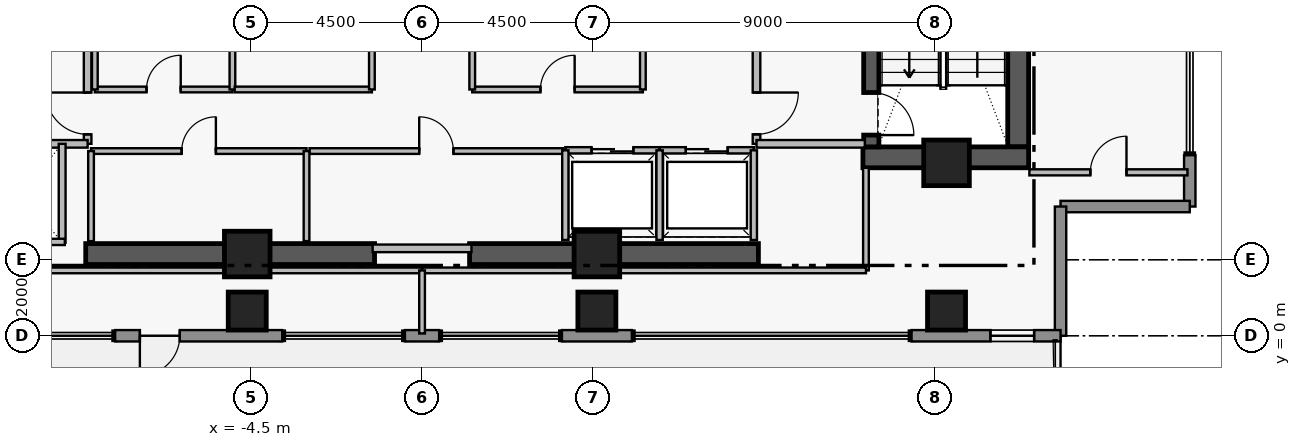
"""IFC4 building model, lengths in metres.
Left out: names, types, materials, properties, quantities, classifications, styles, units other than length and angle.
Written with IfcOpenShell. Run it as: python <this file> out.ifc"""

import sys

from ifc_helpers import new_model, si_unit, direction, frame, frame_2d, origin, origin_2d, place, context, subcontext, project, spatial, rectangle, extrude, element, fill, save


model = new_model("IFC4")
c1 = context("Model", 3, precision=1e-05, world=origin(), true_north=direction((0.0, 1.0)))
c2 = subcontext(c1, "Body", "Model", "MODEL_VIEW")
j1 = project(units=[si_unit("LENGTHUNIT", "METRE"), si_unit("PLANEANGLEUNIT", "RADIAN")], contexts=[c1])
p1 = place(None, origin())
s1 = spatial("IfcSite", under=j1, at=p1, CompositionType="ELEMENT")
p2 = place(p1, origin())
s2 = spatial("IfcBuilding", under=s1, at=p2, CompositionType="ELEMENT")
p3 = place(p2, frame((0.0, 0.0, 265.55)))
s3 = spatial("IfcBuildingStorey", under=s2, at=p3, CompositionType="ELEMENT", Elevation=265.55)
p4 = place(p3, frame((15.685, 4.97, 0.0), z_axis=(0.0, 0.0, 1.0), x_axis=(0.0, 1.0, 0.0)))
e1 = element("IfcWall", 1, at=p4, inside=s3, PredefinedType="SHEAR", context=c2, shape_type="SweptSolid", body=[
    extrude(rectangle(XDim=8.96, YDim=0.55, at=frame_2d((4.48, 0.0))), origin(), (0.0, 0.0, 1.0), 3.51),
])
p5 = place(p3, frame((11.6, 4.695, 0.0), z_axis=(0.0, 0.0, 1.0), x_axis=(1.0, 0.0, 0.0)))
e2 = element("IfcWall", 2, at=p5, inside=s3, PredefinedType="SHEAR", context=c2, shape_type="SweptSolid", body=[
    extrude(rectangle(XDim=4.36, YDim=0.55, at=frame_2d((2.18, 0.0))), origin(), (0.0, 0.0, 1.0), 3.51),
])
for number, where, z_axis, x_axis in (
    (3, (-8.85, 2.15, 0.0), (0.0, 0.0, 1.0), (1.0, 0.0, 0.0)),
    (4, (1.25, 2.15, 0.0), (0.0, 0.0, 1.0), (1.0, 0.0, 0.0)),
):
    element("IfcWall", number, at=place(p3, frame(where, z_axis=z_axis, x_axis=x_axis)), inside=s3, PredefinedType="SHEAR", context=c2, shape_type="SweptSolid", body=[
        extrude(rectangle(XDim=7.6, YDim=0.55, at=frame_2d((3.8, 0.0))), origin(), (0.0, 0.0, 1.0), 3.48),
    ])
p6 = place(p3, frame((11.82, 13.93, 0.0), z_axis=(0.0, 0.0, 1.0), x_axis=(0.0, -1.0, 0.0)))
e5 = element("IfcWall", 5, at=p6, inside=s3, PredefinedType="SHEAR", context=c2, shape_type="SweptSolid", body=[
    extrude(rectangle(XDim=8.96, YDim=0.4, at=frame_2d((4.48, 0.0))), origin(), (0.0, 0.0, 1.0), 3.51),
])
p7 = place(p6, frame((7.53, 0.0, 0.0)))
e6 = element("IfcOpeningElement", 6, at=p7, cuts=e5, PredefinedType="OPENING", context=c2, shape_type="SweptSolid", body=[
    extrude(rectangle(XDim=1.12, YDim=2.22, at=frame_2d((0.56, 1.11))), frame((0.0, 0.21, 0.0), z_axis=(0.0, -1.0, 0.0), x_axis=(1.0, 0.0, 0.0)), (0.0, 0.0, 1.0), 0.42),
])
for number, where, z_axis, x_axis in (
    (7, (-4.6, 2.15, 0.0), (0.0, 0.0, 1.0), (1.0, 0.0, 0.0)),
    (8, (4.6, 2.15, 0.0), (0.0, 0.0, 1.0), (1.0, 0.0, 0.0)),
    (9, (13.8, 4.55, 0.0), (0.0, 0.0, 1.0), (1.0, 0.0, 0.0)),
):
    element("IfcColumn", number, at=place(p3, frame(where, z_axis=z_axis, x_axis=x_axis)), inside=s3, PredefinedType="COLUMN", context=c2, shape_type="SweptSolid", body=[
        extrude(rectangle(XDim=1.2, YDim=1.2, at=origin_2d()), origin(), (0.0, 0.0, 1.0), 3.7),
    ])
for number, where, z_axis, x_axis in (
    (10, (-4.6, 0.65, 0.0), (0.0, 0.0, 1.0), (1.0, 0.0, 0.0)),
    (11, (4.6, 0.65, 0.0), (0.0, 0.0, 1.0), (1.0, 0.0, 0.0)),
    (12, (13.8, 0.65, 0.0), (0.0, 0.0, 1.0), (1.0, 0.0, 0.0)),
):
    element("IfcColumn", number, at=place(p3, frame(where, z_axis=z_axis, x_axis=x_axis)), inside=s3, PredefinedType="COLUMN", context=c2, shape_type="SweptSolid", body=[
        extrude(rectangle(XDim=1.0, YDim=1.0, at=origin_2d()), origin(), (0.0, 0.0, 1.0), 3.7),
    ])
p8 = place(p3, frame((20.2, 4.75, 0.0), z_axis=(0.0, 0.0, 1.0), x_axis=(0.0, -1.0, 0.0)))
e13 = element("IfcWall", 13, at=p8, inside=s3, PredefinedType="STANDARD", context=c2, shape_type="SweptSolid", body=[
    extrude(rectangle(XDim=1.35, YDim=0.3, at=frame_2d((0.675, 0.0))), origin(), (0.0, 0.0, 1.0), 3.48),
])
for number, where, z_axis, x_axis in (
    (14, (20.2, 3.4, 0.0), (0.0, 0.0, 1.0), (-1.0, 0.0, 0.0)),
    (15, (16.8, 3.4, 0.0), (0.0, 0.0, 1.0), (0.0, -1.0, 0.0)),
):
    element("IfcWall", number, at=place(p3, frame(where, z_axis=z_axis, x_axis=x_axis)), inside=s3, PredefinedType="STANDARD", context=c2, shape_type="SweptSolid", body=[
        extrude(rectangle(XDim=3.4, YDim=0.3, at=frame_2d((1.7, 0.0))), origin(), (0.0, 0.0, 1.0), 3.48),
    ])
p9 = place(p3, frame((16.8, 0.0, 0.0), z_axis=(0.0, 0.0, 1.0), x_axis=(-1.0, 0.0, 0.0)))
e16 = element("IfcWall", 16, at=p9, inside=s3, PredefinedType="STANDARD", context=c2, shape_type="SweptSolid", body=[
    extrude(rectangle(XDim=3.92, YDim=0.3, at=frame_2d((1.96, 0.0))), origin(), (0.0, 0.0, 1.0), 3.48),
])
p10 = place(p9, frame((0.695, 0.0, 0.95)))
e17 = element("IfcOpeningElement", 17, at=p10, cuts=e16, PredefinedType="OPENING", context=c2, shape_type="SweptSolid", body=[
    extrude(rectangle(XDim=1.15, YDim=1.55, at=frame_2d((0.575, 0.775))), frame((0.0, 0.16, 0.0), z_axis=(0.0, -1.0, 0.0), x_axis=(1.0, 0.0, 0.0)), (0.0, 0.0, 1.0), 0.32),
])
p11 = place(p3, frame((5.52, 0.0, 0.0), z_axis=(0.0, 0.0, 1.0), x_axis=(-1.0, 0.0, 0.0)))
e18 = element("IfcWall", 18, at=p11, inside=s3, PredefinedType="STANDARD", context=c2, shape_type="SweptSolid", body=[
    extrude(rectangle(XDim=1.84, YDim=0.3, at=frame_2d((0.92, 0.0))), origin(), (0.0, 0.0, 1.0), 3.48),
])
p12 = place(p3, frame((0.45, 0.0, 0.0), z_axis=(0.0, 0.0, 1.0), x_axis=(-1.0, 0.0, 0.0)))
e19 = element("IfcWall", 19, at=p12, inside=s3, PredefinedType="STANDARD", context=c2, shape_type="SweptSolid", body=[
    extrude(rectangle(XDim=0.9, YDim=0.3, at=frame_2d((0.45, 0.0))), origin(), (0.0, 0.0, 1.0), 3.48),
])
p13 = place(p3, frame((-3.68, 0.0, 0.0), z_axis=(0.0, 0.0, 1.0), x_axis=(-1.0, 0.0, 0.0)))
e20 = element("IfcWall", 20, at=p13, inside=s3, PredefinedType="STANDARD", context=c2, shape_type="SweptSolid", body=[
    extrude(rectangle(XDim=4.395, YDim=0.3, at=frame_2d((2.198, 0.0))), origin(), (0.0, 0.0, 1.0), 3.48),
])
p14 = place(p13, frame((2.695, 0.0, 0.0)))
e21 = element("IfcOpeningElement", 21, at=p14, cuts=e20, PredefinedType="OPENING", context=c2, shape_type="SweptSolid", body=[
    extrude(rectangle(XDim=1.05, YDim=2.2, at=frame_2d((0.525, 1.1))), frame((0.0, 0.16, 0.0), z_axis=(0.0, -1.0, 0.0), x_axis=(1.0, 0.0, 0.0)), (0.0, 0.0, 1.0), 0.32),
])
p15 = place(p3, frame((-8.8, 5.05, 0.0), z_axis=(0.0, 0.0, 1.0), x_axis=(0.0, 1.0, 0.0)))
e22 = element("IfcWall", 22, at=p15, inside=s3, PredefinedType="PARTITIONING", context=c2, shape_type="SweptSolid", body=[
    extrude(rectangle(XDim=6.1, YDim=0.2, at=frame_2d((3.05, 0.0))), origin(), (0.0, 0.0, 1.0), 3.48),
])
p16 = place(p15, frame((0.25, 0.0, 0.0)))
e23 = element("IfcOpeningElement", 23, at=p16, cuts=e22, PredefinedType="OPENING", context=c2, shape_type="SweptSolid", body=[
    extrude(rectangle(XDim=1.1, YDim=2.2, at=frame_2d((0.55, 1.1))), frame((0.0, 0.11, 0.0), z_axis=(0.0, -1.0, 0.0), x_axis=(1.0, 0.0, 0.0)), (0.0, 0.0, 1.0), 0.22),
])
p17 = place(p15, frame((3.85, 0.0, 0.0)))
e24 = element("IfcOpeningElement", 24, at=p17, cuts=e22, PredefinedType="OPENING", context=c2, shape_type="SweptSolid", body=[
    extrude(rectangle(XDim=1.1, YDim=2.2, at=frame_2d((0.55, 1.1))), frame((0.0, 0.11, 0.0), z_axis=(0.0, -1.0, 0.0), x_axis=(1.0, 0.0, 0.0)), (0.0, 0.0, 1.0), 0.22),
])
p18 = place(p3, frame((8.8, 11.15, 0.0), z_axis=(0.0, 0.0, 1.0), x_axis=(0.0, -1.0, 0.0)))
e25 = element("IfcWall", 25, at=p18, inside=s3, PredefinedType="PARTITIONING", context=c2, shape_type="SweptSolid", body=[
    extrude(rectangle(XDim=6.1, YDim=0.2, at=frame_2d((3.05, 0.0))), origin(), (0.0, 0.0, 1.0), 3.48),
])
p19 = place(p18, frame((1.15, 0.0, 0.0)))
e26 = element("IfcOpeningElement", 26, at=p19, cuts=e25, PredefinedType="OPENING", context=c2, shape_type="SweptSolid", body=[
    extrude(rectangle(XDim=1.1, YDim=2.2, at=frame_2d((0.55, 1.1))), frame((0.0, 0.11, 0.0), z_axis=(0.0, -1.0, 0.0), x_axis=(1.0, 0.0, 0.0)), (0.0, 0.0, 1.0), 0.22),
])
p20 = place(p18, frame((4.75, 0.0, 0.0)))
e27 = element("IfcOpeningElement", 27, at=p20, cuts=e25, PredefinedType="OPENING", context=c2, shape_type="SweptSolid", body=[
    extrude(rectangle(XDim=1.1, YDim=2.2, at=frame_2d((0.55, 1.1))), frame((0.0, 0.11, 0.0), z_axis=(0.0, -1.0, 0.0), x_axis=(1.0, 0.0, 0.0)), (0.0, 0.0, 1.0), 0.22),
])
p21 = place(p3, frame((3.77, 4.88, 0.0), z_axis=(0.0, 0.0, 1.0), x_axis=(1.0, 0.0, 0.0)))
e28 = element("IfcWall", 28, at=p21, inside=s3, PredefinedType="PARTITIONING", context=c2, shape_type="SweptSolid", body=[
    extrude(rectangle(XDim=2.48, YDim=0.165, at=frame_2d((1.24, 0.0))), origin(), (0.0, 0.0, 1.0), 3.48),
])
p22 = place(p21, frame((0.69, 0.0, 0.0)))
e29 = element("IfcOpeningElement", 29, at=p22, cuts=e28, PredefinedType="OPENING", context=c2, shape_type="SweptSolid", body=[
    extrude(rectangle(XDim=1.1, YDim=2.25, at=frame_2d((0.55, 1.125))), frame((0.0, 0.093, 0.0), z_axis=(0.0, -1.0, 0.0), x_axis=(1.0, 0.0, 0.0)), (0.0, 0.0, 1.0), 0.185),
])
p23 = place(p3, frame((6.25, 4.88, 0.0), z_axis=(0.0, 0.0, 1.0), x_axis=(1.0, 0.0, 0.0)))
e30 = element("IfcWall", 30, at=p23, inside=s3, PredefinedType="PARTITIONING", context=c2, shape_type="SweptSolid", body=[
    extrude(rectangle(XDim=2.48, YDim=0.165, at=frame_2d((1.24, 0.0))), origin(), (0.0, 0.0, 1.0), 3.48),
])
p24 = place(p23, frame((0.69, 0.0, 0.0)))
e31 = element("IfcOpeningElement", 31, at=p24, cuts=e30, PredefinedType="OPENING", context=c2, shape_type="SweptSolid", body=[
    extrude(rectangle(XDim=1.1, YDim=2.25, at=frame_2d((0.55, 1.125))), frame((0.0, 0.093, 0.0), z_axis=(0.0, -1.0, 0.0), x_axis=(1.0, 0.0, 0.0)), (0.0, 0.0, 1.0), 0.185),
])
p25 = place(p3, frame((-8.71, 4.86, 0.0), z_axis=(0.0, 0.0, 1.0), x_axis=(1.0, 0.0, 0.0)))
e32 = element("IfcWall", 32, at=p25, inside=s3, PredefinedType="PARTITIONING", context=c2, shape_type="SweptSolid", body=[
    extrude(rectangle(XDim=5.67, YDim=0.15, at=frame_2d((2.835, 0.0))), origin(), (0.0, 0.0, 1.0), 3.48),
])
p26 = place(p25, frame((2.385, 0.0, 0.0)))
e33 = element("IfcOpeningElement", 33, at=p26, cuts=e32, PredefinedType="OPENING", context=c2, shape_type="SweptSolid", body=[
    extrude(rectangle(XDim=0.9, YDim=2.15, at=frame_2d((0.45, 1.075))), frame((0.0, 0.085, 0.0), z_axis=(0.0, -1.0, 0.0), x_axis=(1.0, 0.0, 0.0)), (0.0, 0.0, 1.0), 0.17),
])
p27 = place(p3, frame((-2.96, 4.86, 0.0), z_axis=(0.0, 0.0, 1.0), x_axis=(1.0, 0.0, 0.0)))
e34 = element("IfcWall", 34, at=p27, inside=s3, PredefinedType="PARTITIONING", context=c2, shape_type="SweptSolid", body=[
    extrude(rectangle(XDim=6.67, YDim=0.15, at=frame_2d((3.335, 0.0))), origin(), (0.0, 0.0, 1.0), 3.48),
])
p28 = place(p27, frame((2.885, 0.0, 0.0)))
e35 = element("IfcOpeningElement", 35, at=p28, cuts=e34, PredefinedType="OPENING", context=c2, shape_type="SweptSolid", body=[
    extrude(rectangle(XDim=0.9, YDim=2.15, at=frame_2d((0.45, 1.075))), frame((0.0, 0.085, 0.0), z_axis=(0.0, -1.0, 0.0), x_axis=(1.0, 0.0, 0.0)), (0.0, 0.0, 1.0), 0.17),
])
p29 = place(p3, frame((-8.61, 6.48, 0.0), z_axis=(0.0, 0.0, 1.0), x_axis=(1.0, 0.0, 0.0)))
e36 = element("IfcWall", 36, at=p29, inside=s3, PredefinedType="PARTITIONING", context=c2, shape_type="SweptSolid", body=[
    extrude(rectangle(XDim=3.62, YDim=0.15, at=frame_2d((1.81, 0.0))), origin(), (0.0, 0.0, 1.0), 3.48),
])
p30 = place(p29, frame((1.36, 0.0, 0.0)))
e37 = element("IfcOpeningElement", 37, at=p30, cuts=e36, PredefinedType="OPENING", context=c2, shape_type="SweptSolid", body=[
    extrude(rectangle(XDim=0.9, YDim=2.15, at=frame_2d((0.45, 1.075))), frame((0.0, 0.085, 0.0), z_axis=(0.0, -1.0, 0.0), x_axis=(1.0, 0.0, 0.0)), (0.0, 0.0, 1.0), 0.17),
])
p31 = place(p3, frame((1.32, 6.48, 0.0), z_axis=(0.0, 0.0, 1.0), x_axis=(1.0, 0.0, 0.0)))
e38 = element("IfcWall", 38, at=p31, inside=s3, PredefinedType="PARTITIONING", context=c2, shape_type="SweptSolid", body=[
    extrude(rectangle(XDim=4.49, YDim=0.15, at=frame_2d((2.245, 0.0))), origin(), (0.0, 0.0, 1.0), 3.48),
])
p32 = place(p31, frame((1.795, 0.0, 0.0)))
e39 = element("IfcOpeningElement", 39, at=p32, cuts=e38, PredefinedType="OPENING", context=c2, shape_type="SweptSolid", body=[
    extrude(rectangle(XDim=0.9, YDim=2.15, at=frame_2d((0.45, 1.075))), frame((0.0, 0.085, 0.0), z_axis=(0.0, -1.0, 0.0), x_axis=(1.0, 0.0, 0.0)), (0.0, 0.0, 1.0), 0.17),
])
p33 = place(p3, frame((15.98, 4.3, 0.0), z_axis=(0.0, 0.0, 1.0), x_axis=(1.0, 0.0, 0.0)))
e40 = element("IfcWall", 40, at=p33, inside=s3, PredefinedType="PARTITIONING", context=c2, shape_type="SweptSolid", body=[
    extrude(rectangle(XDim=4.16, YDim=0.16, at=frame_2d((2.08, 0.0))), origin(), (0.0, 0.0, 1.0), 3.48),
])
p34 = place(p33, frame((1.605, 0.0, 0.0)))
e41 = element("IfcOpeningElement", 41, at=p34, cuts=e40, PredefinedType="OPENING", context=c2, shape_type="SweptSolid", body=[
    extrude(rectangle(XDim=0.95, YDim=2.15, at=frame_2d((0.475, 1.075))), frame((0.0, 0.09, 0.0), z_axis=(0.0, -1.0, 0.0), x_axis=(1.0, 0.0, 0.0)), (0.0, 0.0, 1.0), 0.18),
])
for number, where, z_axis, x_axis in (
    (42, (-11.65, 5.05, 0.0), (0.0, 0.0, 1.0), (1.0, 0.0, 0.0)),
    (43, (8.8, 5.05, 0.0), (0.0, 0.0, 1.0), (1.0, 0.0, 0.0)),
):
    element("IfcWall", number, at=place(p3, frame(where, z_axis=z_axis, x_axis=x_axis)), inside=s3, PredefinedType="PARTITIONING", context=c2, shape_type="SweptSolid", body=[
        extrude(rectangle(XDim=2.85, YDim=0.2, at=frame_2d((1.425, 0.0))), origin(), (0.0, 0.0, 1.0), 3.48),
    ])
for number, where, z_axis, x_axis in (
    (44, (3.77, 2.52, 0.0), (0.0, 0.0, 1.0), (0.0, 1.0, 0.0)),
    (45, (6.25, 2.52, 0.0), (0.0, 0.0, 1.0), (0.0, 1.0, 0.0)),
    (46, (8.73, 2.52, 0.0), (0.0, 0.0, 1.0), (0.0, 1.0, 0.0)),
):
    element("IfcWall", number, at=place(p3, frame(where, z_axis=z_axis, x_axis=x_axis)), inside=s3, PredefinedType="PARTITIONING", context=c2, shape_type="SweptSolid", body=[
        extrude(rectangle(XDim=2.36, YDim=0.165, at=frame_2d((1.18, 0.0))), origin(), (0.0, 0.0, 1.0), 3.48),
    ])
p35 = place(p3, frame((-1.3, 2.3, 0.0), z_axis=(0.0, 0.0, 1.0), x_axis=(1.0, 0.0, 0.0)))
e47 = element("IfcWall", 47, at=p35, inside=s3, PredefinedType="PARTITIONING", context=c2, shape_type="SweptSolid", body=[
    extrude(rectangle(XDim=2.6, YDim=0.2, at=frame_2d((1.3, 0.0))), origin(), (0.0, 0.0, 1.0), 2.38),
])
for number, where, z_axis, x_axis in (
    (48, (-8.71, 2.49, 0.0), (0.0, 0.0, 1.0), (0.0, 1.0, 0.0)),
    (49, (-3.04, 2.49, 0.0), (0.0, 0.0, 1.0), (0.0, 1.0, 0.0)),
):
    element("IfcWall", number, at=place(p3, frame(where, z_axis=z_axis, x_axis=x_axis)), inside=s3, PredefinedType="PARTITIONING", context=c2, shape_type="SweptSolid", body=[
        extrude(rectangle(XDim=2.37, YDim=0.15, at=frame_2d((1.185, 0.0))), origin(), (0.0, 0.0, 1.0), 3.48),
    ])
p36 = place(p3, frame((-9.47, 2.45, 0.0), z_axis=(0.0, 0.0, 1.0), x_axis=(0.0, 1.0, 0.0)))
e50 = element("IfcWall", 50, at=p36, inside=s3, PredefinedType="PARTITIONING", context=c2, shape_type="SweptSolid", body=[
    extrude(rectangle(XDim=2.6, YDim=0.18, at=frame_2d((1.3, 0.0))), origin(), (0.0, 0.0, 1.0), 3.48),
])
p37 = place(p3, frame((-11.71, 2.47, 0.0), z_axis=(0.0, 0.0, 1.0), x_axis=(1.0, 0.0, 0.0)))
e51 = element("IfcWall", 51, at=p37, inside=s3, PredefinedType="PARTITIONING", context=c2, shape_type="SweptSolid", body=[
    extrude(rectangle(XDim=2.31, YDim=0.165, at=frame_2d((1.155, 0.0))), origin(), (0.0, 0.0, 1.0), 2.38),
])
for number, where, z_axis, x_axis in (
    (52, (-8.61, 6.48, 0.0), (0.0, 0.0, 1.0), (0.0, 1.0, 0.0)),
    (53, (-4.99, 6.48, 0.0), (0.0, 0.0, 1.0), (0.0, 1.0, 0.0)),
):
    element("IfcWall", number, at=place(p3, frame(where, z_axis=z_axis, x_axis=x_axis)), inside=s3, PredefinedType="PARTITIONING", context=c2, shape_type="SweptSolid", body=[
        extrude(rectangle(XDim=2.24, YDim=0.15, at=frame_2d((1.12, 0.0))), origin(), (0.0, 0.0, 1.0), 3.48),
    ])
p38 = place(p3, frame((-4.93, 6.48, 0.0), z_axis=(0.0, 0.0, 1.0), x_axis=(1.0, 0.0, 0.0)))
e54 = element("IfcWall", 54, at=p38, inside=s3, PredefinedType="PARTITIONING", context=c2, shape_type="SweptSolid", body=[
    extrude(rectangle(XDim=3.61, YDim=0.15, at=frame_2d((1.805, 0.0))), origin(), (0.0, 0.0, 1.0), 3.48),
])
for number, where, z_axis, x_axis in (
    (55, (-1.32, 6.48, 0.0), (0.0, 0.0, 1.0), (0.0, 1.0, 0.0)),
    (56, (1.32, 6.48, 0.0), (0.0, 0.0, 1.0), (0.0, 1.0, 0.0)),
    (57, (5.81, 6.48, 0.0), (0.0, 0.0, 1.0), (0.0, 1.0, 0.0)),
):
    element("IfcWall", number, at=place(p3, frame(where, z_axis=z_axis, x_axis=x_axis)), inside=s3, PredefinedType="PARTITIONING", context=c2, shape_type="SweptSolid", body=[
        extrude(rectangle(XDim=2.24, YDim=0.15, at=frame_2d((1.12, 0.0))), origin(), (0.0, 0.0, 1.0), 3.48),
    ])
p39 = place(p3, frame((-11.68, 1.72, 0.0), z_axis=(0.0, 0.0, 1.0), x_axis=(1.0, 0.0, 0.0)))
e58 = element("IfcWall", 58, at=p39, inside=s3, PredefinedType="PARTITIONING", context=c2, shape_type="SweptSolid", body=[
    extrude(rectangle(XDim=11.68, YDim=0.15, at=frame_2d((5.84, 0.0))), origin(), (0.0, 0.0, 1.0), 2.38),
])
p40 = place(p3, frame((11.68, 1.72, 0.0), z_axis=(0.0, 0.0, 1.0), x_axis=(0.0, 1.0, 0.0)))
e59 = element("IfcWall", 59, at=p40, inside=s3, PredefinedType="PARTITIONING", context=c2, shape_type="SweptSolid", body=[
    extrude(rectangle(XDim=2.7, YDim=0.15, at=frame_2d((1.35, 0.0))), origin(), (0.0, 0.0, 1.0), 3.48),
])
p41 = place(p3, frame((0.0, 1.72, 0.0), z_axis=(0.0, 0.0, 1.0), x_axis=(1.0, 0.0, 0.0)))
e60 = element("IfcWall", 60, at=p41, inside=s3, PredefinedType="PARTITIONING", context=c2, shape_type="SweptSolid", body=[
    extrude(rectangle(XDim=11.68, YDim=0.15, at=frame_2d((5.84, 0.0))), origin(), (0.0, 0.0, 1.0), 2.38),
])
p42 = place(p3, frame((0.0, 0.06, 0.0), z_axis=(0.0, 0.0, 1.0), x_axis=(0.0, 1.0, 0.0)))
e61 = element("IfcWall", 61, at=p42, inside=s3, PredefinedType="PARTITIONING", context=c2, shape_type="SweptSolid", body=[
    extrude(rectangle(XDim=1.66, YDim=0.15, at=frame_2d((0.83, 0.0))), origin(), (0.0, 0.0, 1.0), 3.48),
])
p43 = place(p10, origin())
e62 = element("IfcWindow", 62, at=p43, inside=s3, PartitioningType="SINGLE_PANEL", PredefinedType="WINDOW", context=c2, shape_type="SweptSolid", body=[
    extrude(rectangle(XDim=1.15, YDim=1.55, at=frame_2d((0.575, 0.775))), frame((0.0, 0.03, 0.0), z_axis=(0.0, -1.0, 0.0), x_axis=(1.0, 0.0, 0.0)), (0.0, 0.0, 1.0), 0.06),
])
fill(e17, e62)
p44 = place(p14, origin())
e63 = element("IfcDoor", 63, at=p44, inside=s3, OperationType="SINGLE_SWING_RIGHT", PredefinedType="DOOR", context=c2, shape_type="SweptSolid", body=[
    extrude(rectangle(XDim=1.05, YDim=2.2, at=frame_2d((0.525, 1.1))), frame((0.0, 0.025, 0.0), z_axis=(0.0, -1.0, 0.0), x_axis=(1.0, 0.0, 0.0)), (0.0, 0.0, 1.0), 0.05),
])
fill(e21, e63)
p45 = place(p7, origin())
e64 = element("IfcDoor", 64, at=p45, inside=s3, OperationType="SINGLE_SWING_RIGHT", PredefinedType="DOOR", context=c2, shape_type="SweptSolid", body=[
    extrude(rectangle(XDim=1.12, YDim=2.22, at=frame_2d((0.56, 1.11))), frame((0.0, 0.025, 0.0), z_axis=(0.0, -1.0, 0.0), x_axis=(1.0, 0.0, 0.0)), (0.0, 0.0, 1.0), 0.05),
])
fill(e6, e64)
p46 = place(p16, origin())
e65 = element("IfcDoor", 65, at=p46, inside=s3, OperationType="SINGLE_SWING_RIGHT", PredefinedType="DOOR", context=c2, shape_type="SweptSolid", body=[
    extrude(rectangle(XDim=1.1, YDim=2.2, at=frame_2d((0.55, 1.1))), frame((0.0, 0.025, 0.0), z_axis=(0.0, -1.0, 0.0), x_axis=(1.0, 0.0, 0.0)), (0.0, 0.0, 1.0), 0.05),
])
fill(e23, e65)
p47 = place(p20, origin())
e66 = element("IfcDoor", 66, at=p47, inside=s3, OperationType="SINGLE_SWING_LEFT", PredefinedType="DOOR", context=c2, shape_type="SweptSolid", body=[
    extrude(rectangle(XDim=1.1, YDim=2.2, at=frame_2d((0.55, 1.1))), frame((0.0, 0.025, 0.0), z_axis=(0.0, -1.0, 0.0), x_axis=(1.0, 0.0, 0.0)), (0.0, 0.0, 1.0), 0.05),
])
fill(e27, e66)
p48 = place(p22, origin())
e67 = element("IfcDoor", 67, at=p48, inside=s3, OperationType="SLIDING_TO_LEFT", PredefinedType="DOOR", context=c2, shape_type="SweptSolid", body=[
    extrude(rectangle(XDim=1.1, YDim=2.25, at=frame_2d((0.55, 1.125))), frame((0.0, 0.025, 0.0), z_axis=(0.0, -1.0, 0.0), x_axis=(1.0, 0.0, 0.0)), (0.0, 0.0, 1.0), 0.05),
])
fill(e29, e67)
p49 = place(p24, origin())
e68 = element("IfcDoor", 68, at=p49, inside=s3, OperationType="SLIDING_TO_LEFT", PredefinedType="DOOR", context=c2, shape_type="SweptSolid", body=[
    extrude(rectangle(XDim=1.1, YDim=2.25, at=frame_2d((0.55, 1.125))), frame((0.0, 0.025, 0.0), z_axis=(0.0, -1.0, 0.0), x_axis=(1.0, 0.0, 0.0)), (0.0, 0.0, 1.0), 0.05),
])
fill(e31, e68)
p50 = place(p26, origin())
e69 = element("IfcDoor", 69, at=p50, inside=s3, OperationType="SINGLE_SWING_RIGHT", PredefinedType="DOOR", context=c2, shape_type="SweptSolid", body=[
    extrude(rectangle(XDim=0.9, YDim=2.15, at=frame_2d((0.45, 1.075))), frame((0.0, 0.025, 0.0), z_axis=(0.0, -1.0, 0.0), x_axis=(1.0, 0.0, 0.0)), (0.0, 0.0, 1.0), 0.05),
])
fill(e33, e69)
p51 = place(p28, origin())
e70 = element("IfcDoor", 70, at=p51, inside=s3, OperationType="SINGLE_SWING_LEFT", PredefinedType="DOOR", context=c2, shape_type="SweptSolid", body=[
    extrude(rectangle(XDim=0.9, YDim=2.15, at=frame_2d((0.45, 1.075))), frame((0.0, 0.025, 0.0), z_axis=(0.0, -1.0, 0.0), x_axis=(1.0, 0.0, 0.0)), (0.0, 0.0, 1.0), 0.05),
])
fill(e35, e70)
p52 = place(p30, origin())
e71 = element("IfcDoor", 71, at=p52, inside=s3, OperationType="SINGLE_SWING_RIGHT", PredefinedType="DOOR", context=c2, shape_type="SweptSolid", body=[
    extrude(rectangle(XDim=0.9, YDim=2.15, at=frame_2d((0.45, 1.075))), frame((0.0, 0.025, 0.0), z_axis=(0.0, -1.0, 0.0), x_axis=(1.0, 0.0, 0.0)), (0.0, 0.0, 1.0), 0.05),
])
fill(e37, e71)
p53 = place(p32, origin())
e72 = element("IfcDoor", 72, at=p53, inside=s3, OperationType="SINGLE_SWING_RIGHT", PredefinedType="DOOR", context=c2, shape_type="SweptSolid", body=[
    extrude(rectangle(XDim=0.9, YDim=2.15, at=frame_2d((0.45, 1.075))), frame((0.0, 0.025, 0.0), z_axis=(0.0, -1.0, 0.0), x_axis=(1.0, 0.0, 0.0)), (0.0, 0.0, 1.0), 0.05),
])
fill(e39, e72)
p54 = place(p34, origin())
e73 = element("IfcDoor", 73, at=p54, inside=s3, OperationType="SINGLE_SWING_RIGHT", PredefinedType="DOOR", context=c2, shape_type="SweptSolid", body=[
    extrude(rectangle(XDim=0.95, YDim=2.15, at=frame_2d((0.475, 1.075))), frame((0.0, 0.025, 0.0), z_axis=(0.0, -1.0, 0.0), x_axis=(1.0, 0.0, 0.0)), (0.0, 0.0, 1.0), 0.05),
])
fill(e41, e73)
save(model, sys.argv[1])
